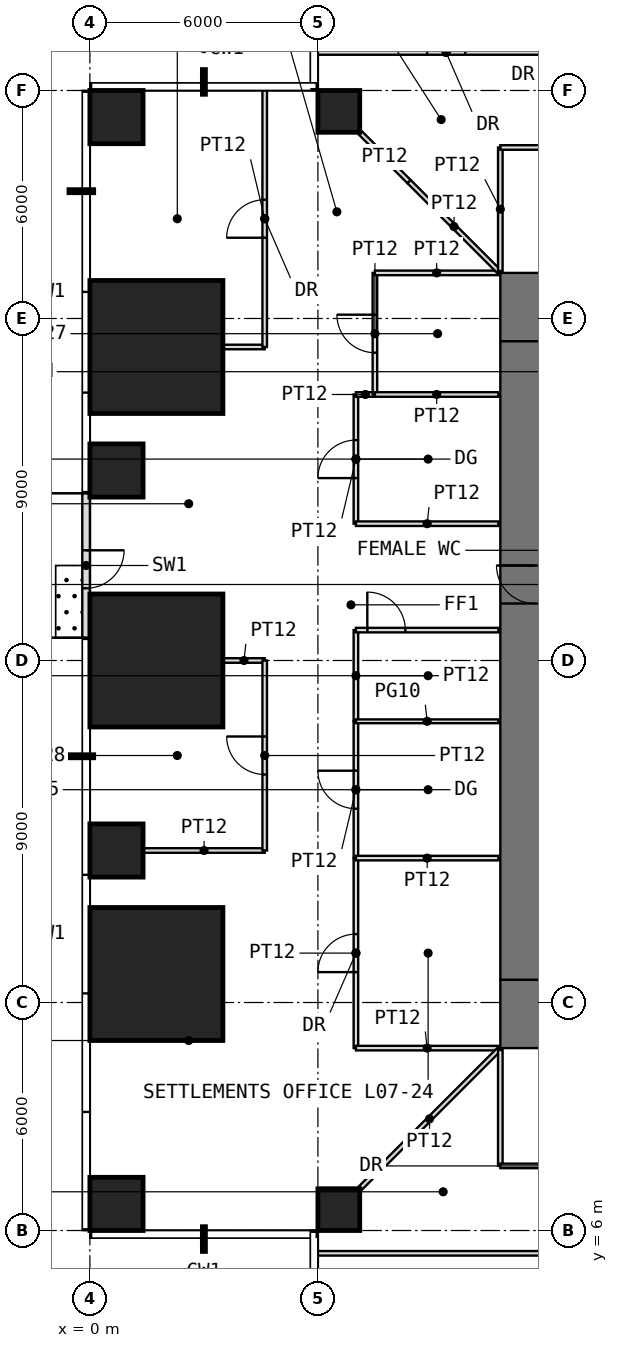
"""IFC4 building model, lengths in metres.
Left out: names, types, materials, properties, quantities, classifications, styles, units other than length and angle.
Written with IfcOpenShell. Run it as: python <this file> out.ifc"""

import sys

from ifc_helpers import new_model, si_unit, direction, frame, frame_2d, origin, origin_2d, place, context, subcontext, project, spatial, rectangle, extrude, element, fill, save


model = new_model("IFC4")
c1 = context("Model", 3, precision=1e-05, world=origin(), true_north=direction((0.0, 1.0)))
c2 = subcontext(c1, "Body", "Model", "MODEL_VIEW")
j1 = project(units=[si_unit("LENGTHUNIT", "METRE"), si_unit("PLANEANGLEUNIT", "RADIAN")], contexts=[c1])
p1 = place(None, origin())
s1 = spatial("IfcSite", under=j1, at=p1, CompositionType="ELEMENT")
p2 = place(p1, origin())
s2 = spatial("IfcBuilding", under=s1, at=p2, CompositionType="ELEMENT")
p3 = place(p2, frame((0.0, 0.0, 34.5)))
s3 = spatial("IfcBuildingStorey", under=s2, at=p3, CompositionType="ELEMENT", Elevation=34.5)
p4 = place(p3, frame((0.7, 6.7, 0.0), z_axis=(0.0, 0.0, 1.0), x_axis=(1.0, 0.0, 0.0)))
e1 = element("IfcColumn", 1, at=p4, inside=s3, PredefinedType="COLUMN", context=c2, shape_type="SweptSolid", body=[
    extrude(rectangle(XDim=1.4, YDim=1.4, at=origin_2d()), origin(), (0.0, 0.0, 1.0), 4.0),
])
p5 = place(p3, frame((6.55, 6.55, 0.0), z_axis=(0.0, 0.0, 1.0), x_axis=(1.0, 0.0, 0.0)))
e2 = element("IfcColumn", 2, at=p5, inside=s3, PredefinedType="COLUMN", context=c2, shape_type="SweptSolid", body=[
    extrude(rectangle(XDim=1.1, YDim=1.1, at=origin_2d()), origin(), (0.0, 0.0, 1.0), 4.0),
])
p6 = place(p3, frame((1.75, 12.75, 0.0), z_axis=(0.0, 0.0, 1.0), x_axis=(1.0, 0.0, 0.0)))
e3 = element("IfcColumn", 3, at=p6, inside=s3, PredefinedType="COLUMN", context=c2, shape_type="SweptSolid", body=[
    extrude(rectangle(XDim=3.5, YDim=3.5, at=origin_2d()), origin(), (0.0, 0.0, 1.0), 4.0),
])
p7 = place(p3, frame((0.7, 16.0, 0.0), z_axis=(0.0, 0.0, 1.0), x_axis=(1.0, 0.0, 0.0)))
e4 = element("IfcColumn", 4, at=p7, inside=s3, PredefinedType="COLUMN", context=c2, shape_type="SweptSolid", body=[
    extrude(rectangle(XDim=1.4, YDim=1.4, at=origin_2d()), origin(), (0.0, 0.0, 1.0), 4.0),
])
p8 = place(p3, frame((1.75, 21.0, 0.0), z_axis=(0.0, 0.0, 1.0), x_axis=(1.0, 0.0, 0.0)))
e5 = element("IfcColumn", 5, at=p8, inside=s3, PredefinedType="COLUMN", context=c2, shape_type="SweptSolid", body=[
    extrude(rectangle(XDim=3.5, YDim=3.5, at=origin_2d()), origin(), (0.0, 0.0, 1.0), 4.0),
])
p9 = place(p3, frame((0.7, 26.0, 0.0), z_axis=(0.0, 0.0, 1.0), x_axis=(1.0, 0.0, 0.0)))
e6 = element("IfcColumn", 6, at=p9, inside=s3, PredefinedType="COLUMN", context=c2, shape_type="SweptSolid", body=[
    extrude(rectangle(XDim=1.4, YDim=1.4, at=origin_2d()), origin(), (0.0, 0.0, 1.0), 4.0),
])
p10 = place(p3, frame((1.75, 29.25, 0.0), z_axis=(0.0, 0.0, 1.0), x_axis=(1.0, 0.0, 0.0)))
e7 = element("IfcColumn", 7, at=p10, inside=s3, PredefinedType="COLUMN", context=c2, shape_type="SweptSolid", body=[
    extrude(rectangle(XDim=3.5, YDim=3.5, at=origin_2d()), origin(), (0.0, 0.0, 1.0), 4.0),
])
p11 = place(p3, frame((0.7, 35.3, 0.0), z_axis=(0.0, 0.0, 1.0), x_axis=(1.0, 0.0, 0.0)))
e8 = element("IfcColumn", 8, at=p11, inside=s3, PredefinedType="COLUMN", context=c2, shape_type="SweptSolid", body=[
    extrude(rectangle(XDim=1.4, YDim=1.4, at=origin_2d()), origin(), (0.0, 0.0, 1.0), 4.0),
])
p12 = place(p3, frame((6.55, 35.45, 0.0), z_axis=(0.0, 0.0, 1.0), x_axis=(1.0, 0.0, 0.0)))
e9 = element("IfcColumn", 9, at=p12, inside=s3, PredefinedType="COLUMN", context=c2, shape_type="SweptSolid", body=[
    extrude(rectangle(XDim=1.1, YDim=1.1, at=origin_2d()), origin(), (0.0, 0.0, 1.0), 4.0),
])
p13 = place(p3, frame((-0.1, 25.4, 0.0), z_axis=(0.0, 0.0, 1.0), x_axis=(0.0, -1.0, 0.0)))
e10 = element("IfcWall", 10, at=p13, inside=s3, PredefinedType="USERDEFINED", context=c2, shape_type="SweptSolid", body=[
    extrude(rectangle(XDim=3.8, YDim=0.2, at=frame_2d((1.9, 0.0))), origin(), (0.0, 0.0, 1.0), 3.75),
])
p14 = place(p13, frame((1.5, 0.0, 0.0)))
e11 = element("IfcOpeningElement", 11, at=p14, cuts=e10, PredefinedType="OPENING", context=c2, shape_type="SweptSolid", body=[
    extrude(rectangle(XDim=1.0, YDim=2.4, at=frame_2d((0.5, 1.2))), frame((0.0, 0.11, 0.0), z_axis=(0.0, -1.0, 0.0), x_axis=(1.0, 0.0, 0.0)), (0.0, 0.0, 1.0), 0.22),
])
p15 = place(p3, frame((10.8, 11.7, -0.05), z_axis=(0.0, 0.0, 1.0), x_axis=(1.0, 0.0, 0.0)))
e12 = element("IfcWall", 12, at=p15, inside=s3, PredefinedType="SHEAR", context=c2, shape_type="SweptSolid", body=[
    extrude(rectangle(XDim=20.4, YDim=1.8, at=frame_2d((10.2, 0.0))), origin(), (0.0, 0.0, 1.0), 4.0),
])
p16 = place(p15, frame((9.2, 0.0, 0.05)))
e13 = element("IfcOpeningElement", 13, at=p16, cuts=e12, PredefinedType="OPENING", context=c2, shape_type="SweptSolid", body=[
    extrude(rectangle(XDim=2.0, YDim=2.2, at=frame_2d((1.0, 1.1))), frame((0.0, 0.91, 0.0), z_axis=(0.0, -1.0, 0.0), x_axis=(1.0, 0.0, 0.0)), (0.0, 0.0, 1.0), 1.82),
])
p17 = place(p3, frame((10.8, 30.3, -0.05), z_axis=(0.0, 0.0, 1.0), x_axis=(1.0, 0.0, 0.0)))
e14 = element("IfcWall", 14, at=p17, inside=s3, PredefinedType="SHEAR", context=c2, shape_type="SweptSolid", body=[
    extrude(rectangle(XDim=20.4, YDim=1.8, at=frame_2d((10.2, 0.0))), origin(), (0.0, 0.0, 1.0), 4.0),
])
p18 = place(p17, frame((9.2, 0.0, 0.05)))
e15 = element("IfcOpeningElement", 15, at=p18, cuts=e14, PredefinedType="OPENING", context=c2, shape_type="SweptSolid", body=[
    extrude(rectangle(XDim=2.0, YDim=2.2, at=frame_2d((1.0, 1.1))), frame((0.0, 0.91, 0.0), z_axis=(0.0, -1.0, 0.0), x_axis=(1.0, 0.0, 0.0)), (0.0, 0.0, 1.0), 1.82),
])
p19 = place(p3, frame((11.7, 12.6, -0.05), z_axis=(0.0, 0.0, 1.0), x_axis=(0.0, 1.0, 0.0)))
e16 = element("IfcWall", 16, at=p19, inside=s3, PredefinedType="SHEAR", context=c2, shape_type="SweptSolid", body=[
    extrude(rectangle(XDim=16.8, YDim=1.8, at=frame_2d((8.4, 0.0))), origin(), (0.0, 0.0, 1.0), 4.0),
])
p20 = place(p19, frame((9.9, 0.0, 0.05)))
e17 = element("IfcOpeningElement", 17, at=p20, cuts=e16, PredefinedType="OPENING", context=c2, shape_type="SweptSolid", body=[
    extrude(rectangle(XDim=1.0, YDim=2.2, at=frame_2d((0.5, 1.1))), frame((0.0, 0.91, 0.0), z_axis=(0.0, -1.0, 0.0), x_axis=(1.0, 0.0, 0.0)), (0.0, 0.0, 1.0), 1.82),
])
p21 = place(p3, frame((1.41, 16.0, 0.0), z_axis=(0.0, 0.0, 1.0), x_axis=(1.0, 0.0, 0.0)))
e18 = element("IfcWall", 18, at=p21, inside=s3, PredefinedType="PARTITIONING", context=c2, shape_type="SweptSolid", body=[
    extrude(rectangle(XDim=3.19, YDim=0.12, at=frame_2d((1.595, 0.0))), origin(), (0.0, 0.0, 1.0), 3.75),
])
for number, where, z_axis, x_axis in (
    (19, (3.51, 21.0, 0.0), (0.0, 0.0, 1.0), (1.0, 0.0, 0.0)),
    (20, (3.51, 29.25, 0.0), (0.0, 0.0, 1.0), (1.0, 0.0, 0.0)),
):
    element("IfcWall", number, at=place(p3, frame(where, z_axis=z_axis, x_axis=x_axis)), inside=s3, PredefinedType="PARTITIONING", context=c2, shape_type="SweptSolid", body=[
        extrude(rectangle(XDim=1.09, YDim=0.12, at=frame_2d((0.545, 0.0))), origin(), (0.0, 0.0, 1.0), 3.75),
    ])
p22 = place(p3, frame((4.6, 16.0, 0.0), z_axis=(0.0, 0.0, 1.0), x_axis=(0.0, 1.0, 0.0)))
e21 = element("IfcWall", 21, at=p22, inside=s3, PredefinedType="PARTITIONING", context=c2, shape_type="SweptSolid", body=[
    extrude(rectangle(XDim=5.0, YDim=0.12, at=frame_2d((2.5, 0.0))), origin(), (0.0, 0.0, 1.0), 3.75),
])
p23 = place(p22, frame((2.0, 0.0, 0.0)))
e22 = element("IfcOpeningElement", 22, at=p23, cuts=e21, PredefinedType="OPENING", context=c2, shape_type="SweptSolid", body=[
    extrude(rectangle(XDim=1.0, YDim=2.2, at=frame_2d((0.5, 1.1))), frame((0.0, 0.07, 0.0), z_axis=(0.0, -1.0, 0.0), x_axis=(1.0, 0.0, 0.0)), (0.0, 0.0, 1.0), 0.14),
])
p24 = place(p3, frame((4.6, 29.25, 0.0), z_axis=(0.0, 0.0, 1.0), x_axis=(0.0, 1.0, 0.0)))
e23 = element("IfcWall", 23, at=p24, inside=s3, PredefinedType="PARTITIONING", context=c2, shape_type="SweptSolid", body=[
    extrude(rectangle(XDim=6.75, YDim=0.12, at=frame_2d((3.375, 0.0))), origin(), (0.0, 0.0, 1.0), 3.75),
])
p25 = place(p24, frame((2.875, 0.0, 0.0)))
e24 = element("IfcOpeningElement", 24, at=p25, cuts=e23, PredefinedType="OPENING", context=c2, shape_type="SweptSolid", body=[
    extrude(rectangle(XDim=1.0, YDim=2.2, at=frame_2d((0.5, 1.1))), frame((0.0, 0.07, 0.0), z_axis=(0.0, -1.0, 0.0), x_axis=(1.0, 0.0, 0.0)), (0.0, 0.0, 1.0), 0.14),
])
p26 = place(p3, frame((6.0, 5.4, 0.0), z_axis=(0.0, 0.0, 1.0), x_axis=(1.0, 0.0, 0.0)))
e25 = element("IfcWall", 25, at=p26, inside=s3, PredefinedType="PARTITIONING", context=c2, shape_type="SweptSolid", body=[
    extrude(rectangle(XDim=27.0, YDim=0.12, at=frame_2d((13.5, 0.0))), origin(), (0.0, 0.0, 1.0), 3.75),
])
p27 = place(p26, frame((14.8, 0.0, 0.0)))
e26 = element("IfcOpeningElement", 26, at=p27, cuts=e25, PredefinedType="OPENING", context=c2, shape_type="SweptSolid", body=[
    extrude(rectangle(XDim=1.0, YDim=2.4, at=frame_2d((0.5, 1.2))), frame((0.0, 0.07, 0.0), z_axis=(0.0, -1.0, 0.0), x_axis=(1.0, 0.0, 0.0)), (0.0, 0.0, 1.0), 0.14),
])
p28 = place(p3, frame((6.0, 37.0, 0.0), z_axis=(0.0, 0.0, 1.0), x_axis=(1.0, 0.0, 0.0)))
e27 = element("IfcWall", 27, at=p28, inside=s3, PredefinedType="PARTITIONING", context=c2, shape_type="SweptSolid", body=[
    extrude(rectangle(XDim=6.75, YDim=0.12, at=frame_2d((3.375, 0.0))), origin(), (0.0, 0.0, 1.0), 3.75),
])
p29 = place(p28, frame((2.875, 0.0, 0.0)))
e28 = element("IfcOpeningElement", 28, at=p29, cuts=e27, PredefinedType="OPENING", context=c2, shape_type="SweptSolid", body=[
    extrude(rectangle(XDim=1.0, YDim=2.2, at=frame_2d((0.5, 1.1))), frame((0.0, 0.07, 0.0), z_axis=(0.0, -1.0, 0.0), x_axis=(1.0, 0.0, 0.0)), (0.0, 0.0, 1.0), 0.14),
])
p30 = place(p3, frame((7.0, 10.8, 0.0), z_axis=(0.0, 0.0, 1.0), x_axis=(0.0, 1.0, 0.0)))
e29 = element("IfcWall", 29, at=p30, inside=s3, PredefinedType="PARTITIONING", context=c2, shape_type="SweptSolid", body=[
    extrude(rectangle(XDim=5.0, YDim=0.12, at=frame_2d((2.5, 0.0))), origin(), (0.0, 0.0, 1.0), 3.75),
])
p31 = place(p30, frame((2.0, 0.0, 0.0)))
e30 = element("IfcOpeningElement", 30, at=p31, cuts=e29, PredefinedType="OPENING", context=c2, shape_type="SweptSolid", body=[
    extrude(rectangle(XDim=1.0, YDim=2.2, at=frame_2d((0.5, 1.1))), frame((0.0, 0.07, 0.0), z_axis=(0.0, -1.0, 0.0), x_axis=(1.0, 0.0, 0.0)), (0.0, 0.0, 1.0), 0.14),
])
p32 = place(p3, frame((7.0, 10.8, 0.0), z_axis=(0.0, 0.0, 1.0), x_axis=(1.0, 0.0, 0.0)))
e31 = element("IfcWall", 31, at=p32, inside=s3, PredefinedType="PARTITIONING", context=c2, shape_type="SweptSolid", body=[
    extrude(rectangle(XDim=3.75, YDim=0.12, at=frame_2d((1.875, 0.0))), origin(), (0.0, 0.0, 1.0), 3.75),
])
p33 = place(p3, frame((7.0, 15.8, 0.0), z_axis=(0.0, 0.0, 1.0), x_axis=(0.0, 1.0, 0.0)))
e32 = element("IfcWall", 32, at=p33, inside=s3, PredefinedType="PARTITIONING", context=c2, shape_type="SweptSolid", body=[
    extrude(rectangle(XDim=3.6, YDim=0.12, at=frame_2d((1.8, 0.0))), origin(), (0.0, 0.0, 1.0), 3.75),
])
p34 = place(p33, frame((1.3, 0.0, 0.0)))
e33 = element("IfcOpeningElement", 33, at=p34, cuts=e32, PredefinedType="OPENING", context=c2, shape_type="SweptSolid", body=[
    extrude(rectangle(XDim=1.0, YDim=2.4, at=frame_2d((0.5, 1.2))), frame((0.0, 0.07, 0.0), z_axis=(0.0, -1.0, 0.0), x_axis=(1.0, 0.0, 0.0)), (0.0, 0.0, 1.0), 0.14),
])
p35 = place(p3, frame((7.0, 15.8, 0.0), z_axis=(0.0, 0.0, 1.0), x_axis=(1.0, 0.0, 0.0)))
e34 = element("IfcWall", 34, at=p35, inside=s3, PredefinedType="PARTITIONING", context=c2, shape_type="SweptSolid", body=[
    extrude(rectangle(XDim=3.75, YDim=0.12, at=frame_2d((1.875, 0.0))), origin(), (0.0, 0.0, 1.0), 3.75),
])
p36 = place(p3, frame((7.0, 19.4, 0.0), z_axis=(0.0, 0.0, 1.0), x_axis=(0.0, 1.0, 0.0)))
e35 = element("IfcWall", 35, at=p36, inside=s3, PredefinedType="PARTITIONING", context=c2, shape_type="SweptSolid", body=[
    extrude(rectangle(XDim=2.4, YDim=0.12, at=frame_2d((1.2, 0.0))), origin(), (0.0, 0.0, 1.0), 3.75),
])
p37 = place(p3, frame((7.0, 19.4, 0.0), z_axis=(0.0, 0.0, 1.0), x_axis=(1.0, 0.0, 0.0)))
e36 = element("IfcWall", 36, at=p37, inside=s3, PredefinedType="PARTITIONING", context=c2, shape_type="SweptSolid", body=[
    extrude(rectangle(XDim=3.75, YDim=0.1, at=frame_2d((1.875, 0.0))), origin(), (0.0, 0.0, 1.0), 3.75),
])
p38 = place(p3, frame((7.0, 21.8, 0.0), z_axis=(0.0, 0.0, 1.0), x_axis=(1.0, 0.0, 0.0)))
e37 = element("IfcWall", 37, at=p38, inside=s3, PredefinedType="PARTITIONING", context=c2, shape_type="SweptSolid", body=[
    extrude(rectangle(XDim=3.75, YDim=0.12, at=frame_2d((1.875, 0.0))), origin(), (0.0, 0.0, 1.0), 3.75),
])
p39 = place(p38, frame((0.3, 0.0, 0.0)))
e38 = element("IfcOpeningElement", 38, at=p39, cuts=e37, PredefinedType="OPENING", context=c2, shape_type="SweptSolid", body=[
    extrude(rectangle(XDim=1.0, YDim=2.4, at=frame_2d((0.5, 1.2))), frame((0.0, 0.07, 0.0), z_axis=(0.0, -1.0, 0.0), x_axis=(1.0, 0.0, 0.0)), (0.0, 0.0, 1.0), 0.14),
])
p40 = place(p3, frame((7.0, 24.6, 0.0), z_axis=(0.0, 0.0, 1.0), x_axis=(0.0, 1.0, 0.0)))
e39 = element("IfcWall", 39, at=p40, inside=s3, PredefinedType="PARTITIONING", context=c2, shape_type="SweptSolid", body=[
    extrude(rectangle(XDim=3.4, YDim=0.12, at=frame_2d((1.7, 0.0))), origin(), (0.0, 0.0, 1.0), 3.75),
])
p41 = place(p40, frame((1.2, 0.0, 0.0)))
e40 = element("IfcOpeningElement", 40, at=p41, cuts=e39, PredefinedType="OPENING", context=c2, shape_type="SweptSolid", body=[
    extrude(rectangle(XDim=1.0, YDim=2.4, at=frame_2d((0.5, 1.2))), frame((0.0, 0.07, 0.0), z_axis=(0.0, -1.0, 0.0), x_axis=(1.0, 0.0, 0.0)), (0.0, 0.0, 1.0), 0.14),
])
p42 = place(p3, frame((7.0, 24.6, 0.0), z_axis=(0.0, 0.0, 1.0), x_axis=(1.0, 0.0, 0.0)))
e41 = element("IfcWall", 41, at=p42, inside=s3, PredefinedType="PARTITIONING", context=c2, shape_type="SweptSolid", body=[
    extrude(rectangle(XDim=3.75, YDim=0.12, at=frame_2d((1.875, 0.0))), origin(), (0.0, 0.0, 1.0), 3.75),
])
p43 = place(p3, frame((7.0, 28.0, 0.0), z_axis=(0.0, 0.0, 1.0), x_axis=(1.0, 0.0, 0.0)))
e42 = element("IfcWall", 42, at=p43, inside=s3, PredefinedType="PARTITIONING", context=c2, shape_type="SweptSolid", body=[
    extrude(rectangle(XDim=0.5, YDim=0.12, at=frame_2d((0.25, 0.0))), origin(), (0.0, 0.0, 1.0), 3.75),
])
p44 = place(p3, frame((7.11, 7.11, 0.0), z_axis=(0.0, 0.0, 1.0), x_axis=(0.707106781187, 0.707106781187, 0.0)))
e43 = element("IfcWall", 43, at=p44, inside=s3, PredefinedType="PARTITIONING", context=c2, shape_type="SweptSolid", body=[
    extrude(rectangle(XDim=5.168, YDim=0.12, at=frame_2d((2.584, 0.0))), origin(), (0.0, 0.0, 1.0), 3.75),
])
p45 = place(p3, frame((7.11, 34.89, 0.0), z_axis=(0.0, 0.0, 1.0), x_axis=(0.707106781187, -0.707106781187, 0.0)))
e44 = element("IfcWall", 44, at=p45, inside=s3, PredefinedType="PARTITIONING", context=c2, shape_type="SweptSolid", body=[
    extrude(rectangle(XDim=1.822, YDim=0.12, at=frame_2d((0.911, 0.0))), origin(), (0.0, 0.0, 1.0), 3.75),
])
p46 = place(p3, frame((7.5, 28.0, 0.0), z_axis=(0.0, 0.0, 1.0), x_axis=(0.0, 1.0, 0.0)))
e45 = element("IfcWall", 45, at=p46, inside=s3, PredefinedType="PARTITIONING", context=c2, shape_type="SweptSolid", body=[
    extrude(rectangle(XDim=3.2, YDim=0.12, at=frame_2d((1.6, 0.0))), origin(), (0.0, 0.0, 1.0), 3.75),
])
p47 = place(p46, frame((1.1, 0.0, 0.0)))
e46 = element("IfcOpeningElement", 46, at=p47, cuts=e45, PredefinedType="OPENING", context=c2, shape_type="SweptSolid", body=[
    extrude(rectangle(XDim=1.0, YDim=2.2, at=frame_2d((0.5, 1.1))), frame((0.0, 0.07, 0.0), z_axis=(0.0, -1.0, 0.0), x_axis=(1.0, 0.0, 0.0)), (0.0, 0.0, 1.0), 0.14),
])
for number, where, z_axis, x_axis in (
    (47, (7.5, 28.0, 0.0), (0.0, 0.0, 1.0), (1.0, 0.0, 0.0)),
    (48, (7.5, 31.2, 0.0), (0.0, 0.0, 1.0), (1.0, 0.0, 0.0)),
):
    element("IfcWall", number, at=place(p3, frame(where, z_axis=z_axis, x_axis=x_axis)), inside=s3, PredefinedType="PARTITIONING", context=c2, shape_type="SweptSolid", body=[
        extrude(rectangle(XDim=3.25, YDim=0.12, at=frame_2d((1.625, 0.0))), origin(), (0.0, 0.0, 1.0), 3.75),
    ])
p48 = place(p3, frame((8.398, 33.602, 0.0), z_axis=(0.0, 0.0, 1.0), x_axis=(0.707106781187, -0.707106781187, 0.0)))
e49 = element("IfcWall", 49, at=p48, inside=s3, PredefinedType="PARTITIONING", context=c2, shape_type="SweptSolid", body=[
    extrude(rectangle(XDim=3.346, YDim=0.12, at=frame_2d((1.673, 0.0))), origin(), (0.0, 0.0, 1.0), 3.75),
])
p49 = place(p3, frame((10.8, 7.7, 0.0), z_axis=(0.0, 0.0, 1.0), x_axis=(0.0, 1.0, 0.0)))
e50 = element("IfcWall", 50, at=p49, inside=s3, PredefinedType="PARTITIONING", context=c2, shape_type="SweptSolid", body=[
    extrude(rectangle(XDim=3.05, YDim=0.12, at=frame_2d((1.525, 0.0))), origin(), (0.0, 0.0, 1.0), 3.75),
])
p50 = place(p3, frame((10.8, 7.7, 0.0), z_axis=(0.0, 0.0, 1.0), x_axis=(1.0, 0.0, 0.0)))
e51 = element("IfcWall", 51, at=p50, inside=s3, PredefinedType="PARTITIONING", context=c2, shape_type="SweptSolid", body=[
    extrude(rectangle(XDim=3.6, YDim=0.12, at=frame_2d((1.8, 0.0))), origin(), (0.0, 0.0, 1.0), 3.75),
])
p51 = place(p50, frame((1.3, 0.0, 0.0)))
e52 = element("IfcOpeningElement", 52, at=p51, cuts=e51, PredefinedType="OPENING", context=c2, shape_type="SweptSolid", body=[
    extrude(rectangle(XDim=1.0, YDim=2.2, at=frame_2d((0.5, 1.1))), frame((0.0, 0.07, 0.0), z_axis=(0.0, -1.0, 0.0), x_axis=(1.0, 0.0, 0.0)), (0.0, 0.0, 1.0), 0.14),
])
p52 = place(p3, frame((10.8, 31.25, 0.0), z_axis=(0.0, 0.0, 1.0), x_axis=(0.0, 1.0, 0.0)))
e53 = element("IfcWall", 53, at=p52, inside=s3, PredefinedType="PARTITIONING", context=c2, shape_type="SweptSolid", body=[
    extrude(rectangle(XDim=3.25, YDim=0.12, at=frame_2d((1.625, 0.0))), origin(), (0.0, 0.0, 1.0), 3.75),
])
p53 = place(p3, frame((10.8, 34.5, 0.0), z_axis=(0.0, 0.0, 1.0), x_axis=(1.0, 0.0, 0.0)))
e54 = element("IfcWall", 54, at=p53, inside=s3, PredefinedType="PARTITIONING", context=c2, shape_type="SweptSolid", body=[
    extrude(rectangle(XDim=3.4, YDim=0.12, at=frame_2d((1.7, 0.0))), origin(), (0.0, 0.0, 1.0), 3.75),
])
p54 = place(p53, frame((1.2, 0.0, 0.0)))
e55 = element("IfcOpeningElement", 55, at=p54, cuts=e54, PredefinedType="OPENING", context=c2, shape_type="SweptSolid", body=[
    extrude(rectangle(XDim=1.0, YDim=2.2, at=frame_2d((0.5, 1.1))), frame((0.0, 0.07, 0.0), z_axis=(0.0, -1.0, 0.0), x_axis=(1.0, 0.0, 0.0)), (0.0, 0.0, 1.0), 0.14),
])
p55 = place(p14, origin())
e56 = element("IfcDoor", 56, at=p55, inside=s3, OperationType="SINGLE_SWING_LEFT", PredefinedType="DOOR", context=c2, shape_type="SweptSolid", body=[
    extrude(rectangle(XDim=1.0, YDim=2.4, at=frame_2d((0.5, 1.2))), frame((0.0, 0.025, 0.0), z_axis=(0.0, -1.0, 0.0), x_axis=(1.0, 0.0, 0.0)), (0.0, 0.0, 1.0), 0.05),
])
fill(e11, e56)
p56 = place(p20, origin())
e57 = element("IfcDoor", 57, at=p56, inside=s3, OperationType="SINGLE_SWING_RIGHT", PredefinedType="DOOR", context=c2, shape_type="SweptSolid", body=[
    extrude(rectangle(XDim=1.0, YDim=2.2, at=frame_2d((0.5, 1.1))), frame((0.0, 0.025, 0.0), z_axis=(0.0, -1.0, 0.0), x_axis=(1.0, 0.0, 0.0)), (0.0, 0.0, 1.0), 0.05),
])
fill(e17, e57)
p57 = place(p29, origin())
e58 = element("IfcDoor", 58, at=p57, inside=s3, OperationType="SINGLE_SWING_RIGHT", PredefinedType="DOOR", context=c2, shape_type="SweptSolid", body=[
    extrude(rectangle(XDim=1.0, YDim=2.2, at=frame_2d((0.5, 1.1))), frame((0.0, 0.025, 0.0), z_axis=(0.0, -1.0, 0.0), x_axis=(1.0, 0.0, 0.0)), (0.0, 0.0, 1.0), 0.05),
])
fill(e28, e58)
p58 = place(p31, origin())
e59 = element("IfcDoor", 59, at=p58, inside=s3, OperationType="SINGLE_SWING_LEFT", PredefinedType="DOOR", context=c2, shape_type="SweptSolid", body=[
    extrude(rectangle(XDim=1.0, YDim=2.2, at=frame_2d((0.5, 1.1))), frame((0.0, 0.025, 0.0), z_axis=(0.0, -1.0, 0.0), x_axis=(1.0, 0.0, 0.0)), (0.0, 0.0, 1.0), 0.05),
])
fill(e30, e59)
p59 = place(p34, origin())
e60 = element("IfcDoor", 60, at=p59, inside=s3, OperationType="SINGLE_SWING_RIGHT", PredefinedType="DOOR", context=c2, shape_type="SweptSolid", body=[
    extrude(rectangle(XDim=1.0, YDim=2.4, at=frame_2d((0.5, 1.2))), frame((0.0, 0.025, 0.0), z_axis=(0.0, -1.0, 0.0), x_axis=(1.0, 0.0, 0.0)), (0.0, 0.0, 1.0), 0.05),
])
fill(e33, e60)
p60 = place(p41, origin())
e61 = element("IfcDoor", 61, at=p60, inside=s3, OperationType="SINGLE_SWING_LEFT", PredefinedType="DOOR", context=c2, shape_type="SweptSolid", body=[
    extrude(rectangle(XDim=1.0, YDim=2.4, at=frame_2d((0.5, 1.2))), frame((0.0, 0.025, 0.0), z_axis=(0.0, -1.0, 0.0), x_axis=(1.0, 0.0, 0.0)), (0.0, 0.0, 1.0), 0.05),
])
fill(e40, e61)
p61 = place(p47, origin())
e62 = element("IfcDoor", 62, at=p61, inside=s3, OperationType="SINGLE_SWING_RIGHT", PredefinedType="DOOR", context=c2, shape_type="SweptSolid", body=[
    extrude(rectangle(XDim=1.0, YDim=2.2, at=frame_2d((0.5, 1.1))), frame((0.0, 0.025, 0.0), z_axis=(0.0, -1.0, 0.0), x_axis=(1.0, 0.0, 0.0)), (0.0, 0.0, 1.0), 0.05),
])
fill(e46, e62)
p62 = place(p23, origin())
e63 = element("IfcDoor", 63, at=p62, inside=s3, OperationType="SINGLE_SWING_RIGHT", PredefinedType="DOOR", context=c2, shape_type="SweptSolid", body=[
    extrude(rectangle(XDim=1.0, YDim=2.2, at=frame_2d((0.5, 1.1))), frame((0.0, 0.025, 0.0), z_axis=(0.0, -1.0, 0.0), x_axis=(1.0, 0.0, 0.0)), (0.0, 0.0, 1.0), 0.05),
])
fill(e22, e63)
p63 = place(p25, origin())
e64 = element("IfcDoor", 64, at=p63, inside=s3, OperationType="SINGLE_SWING_LEFT", PredefinedType="DOOR", context=c2, shape_type="SweptSolid", body=[
    extrude(rectangle(XDim=1.0, YDim=2.2, at=frame_2d((0.5, 1.1))), frame((0.0, 0.025, 0.0), z_axis=(0.0, -1.0, 0.0), x_axis=(1.0, 0.0, 0.0)), (0.0, 0.0, 1.0), 0.05),
])
fill(e24, e64)
p64 = place(p39, origin())
e65 = element("IfcDoor", 65, at=p64, inside=s3, OperationType="SINGLE_SWING_LEFT", PredefinedType="DOOR", context=c2, shape_type="SweptSolid", body=[
    extrude(rectangle(XDim=1.0, YDim=2.4, at=frame_2d((0.5, 1.2))), frame((0.0, 0.025, 0.0), z_axis=(0.0, -1.0, 0.0), x_axis=(1.0, 0.0, 0.0)), (0.0, 0.0, 1.0), 0.05),
])
fill(e38, e65)
save(model, sys.argv[1])
